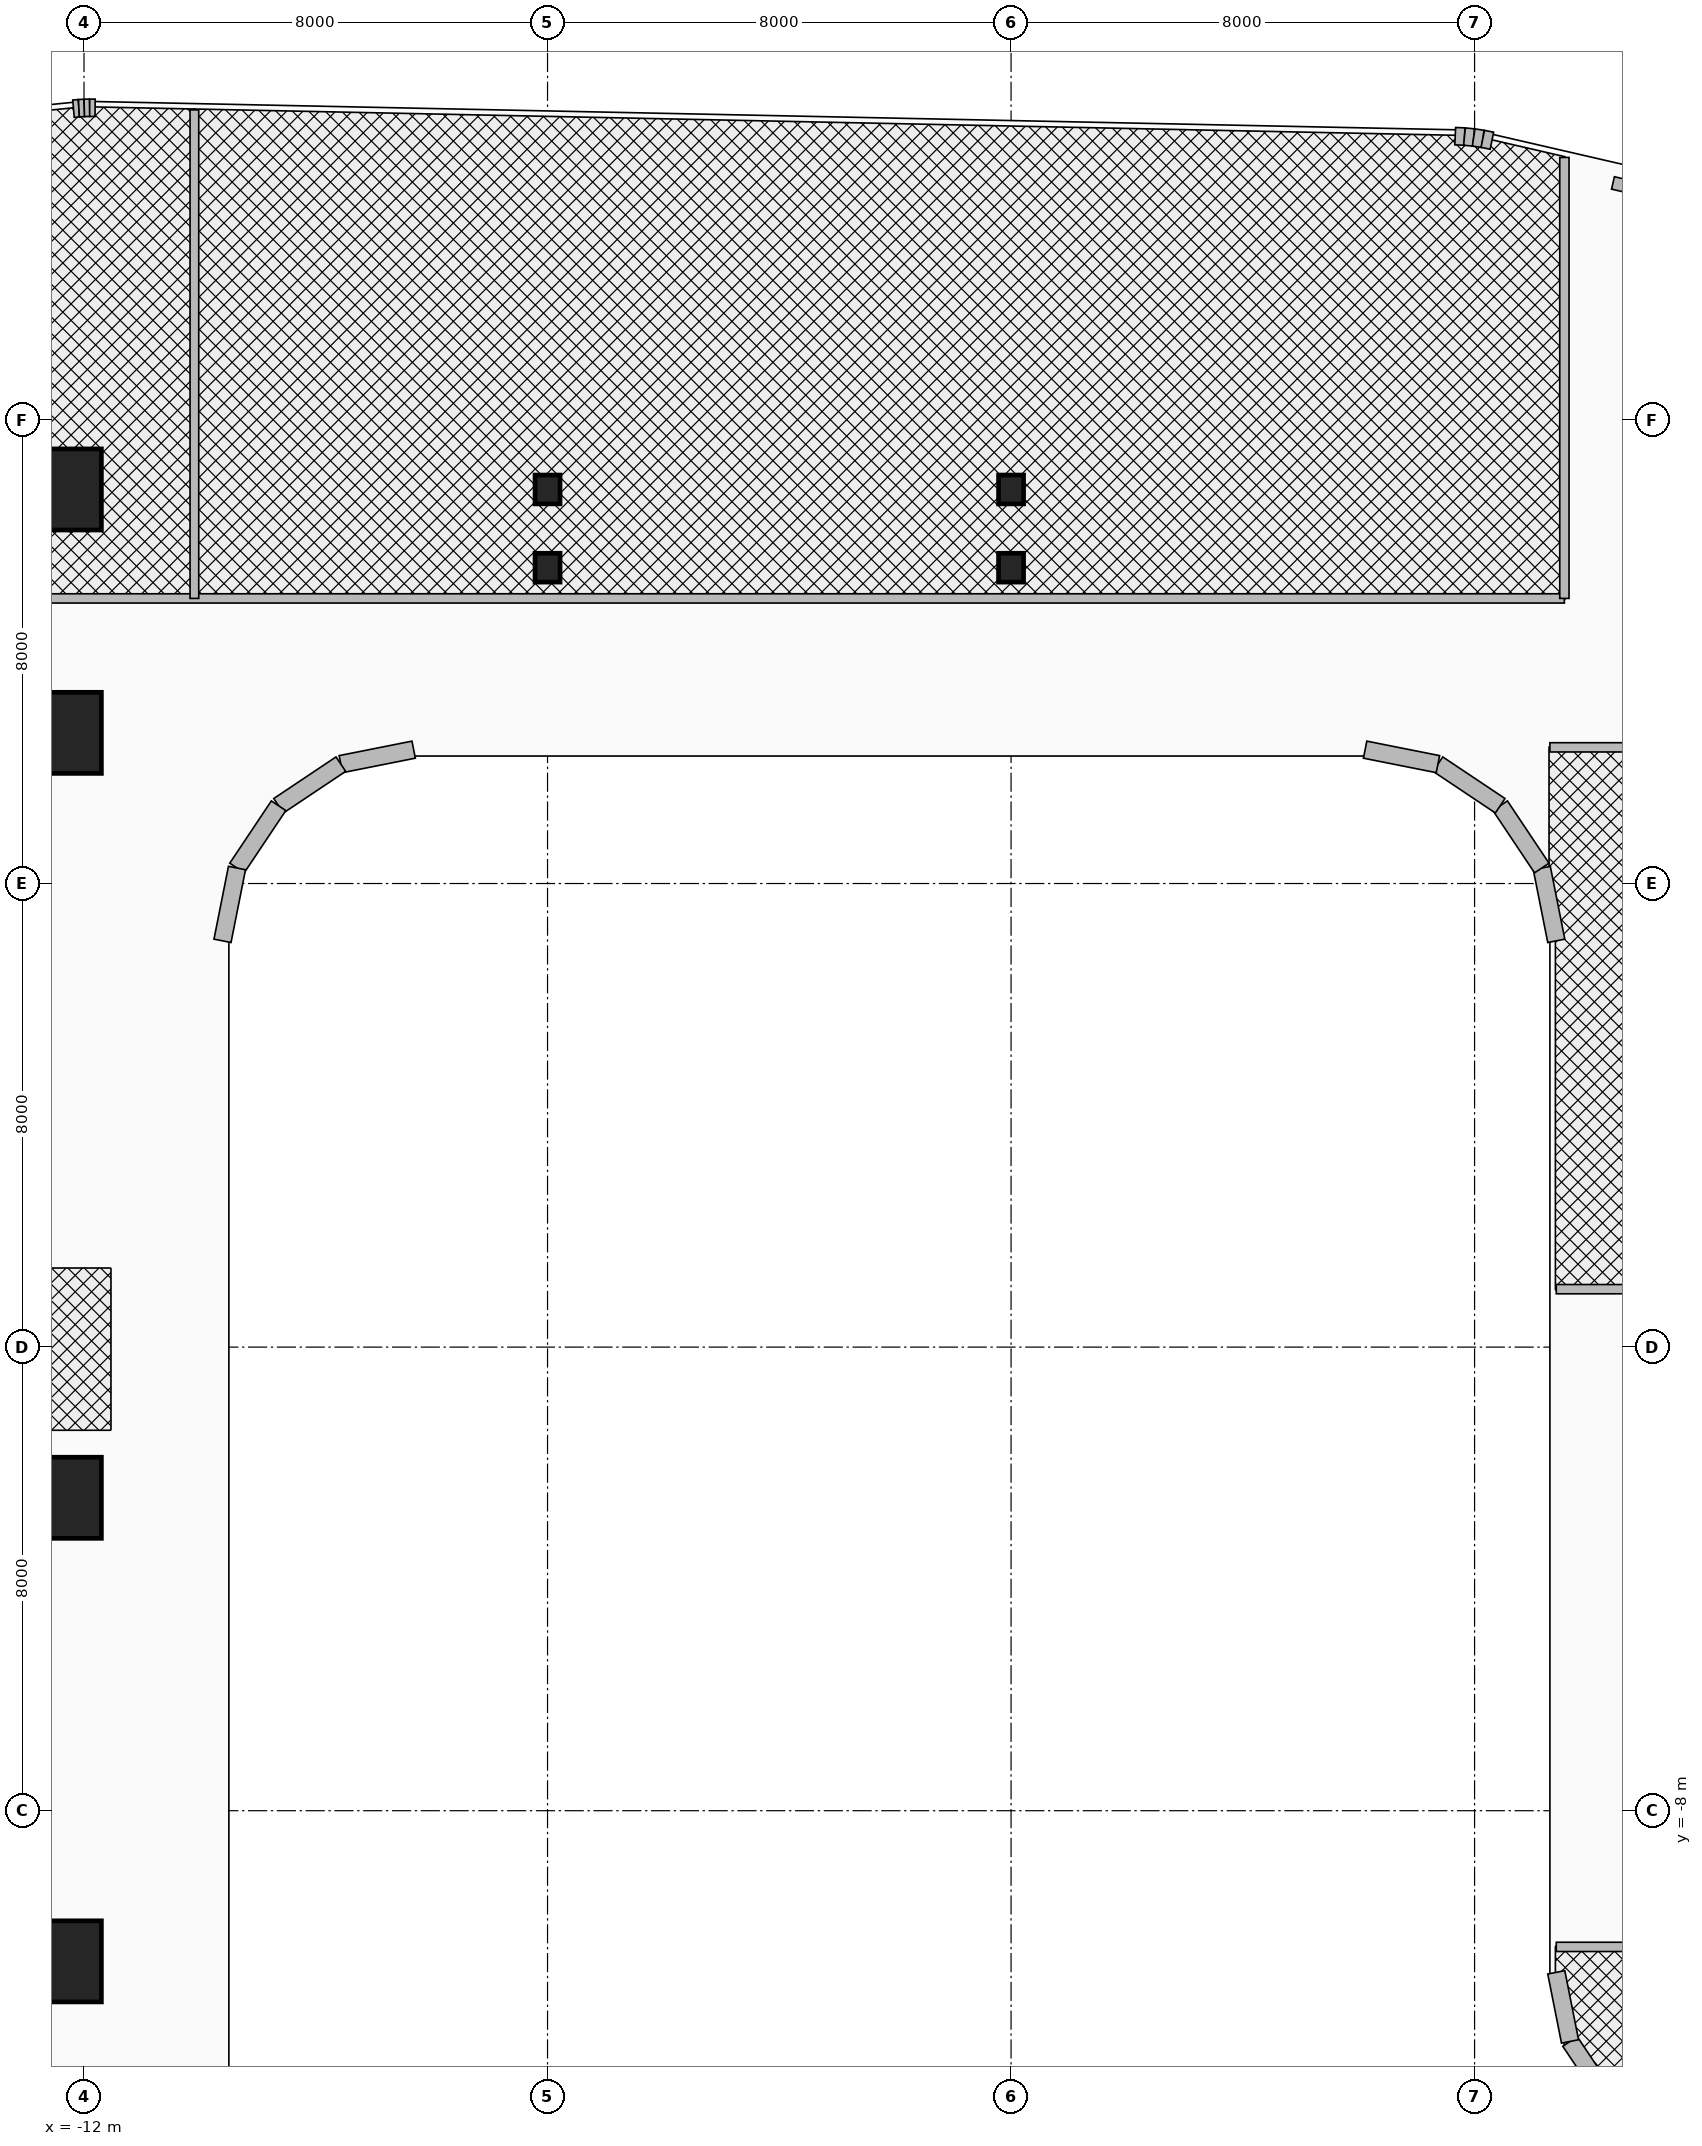
"""IFC4 building model, lengths in metres.
Left out: names, types, materials, properties, quantities, classifications, styles, units other than length and angle.
Written with IfcOpenShell. Run it as: python <this file> out.ifc"""

import sys

from ifc_helpers import new_model, si_unit, direction, frame, frame_2d, origin, origin_2d, place, context, subcontext, project, spatial, rectangle, i_section, extrude, source, transform, mapped, element, fill, save


model = new_model("IFC4")
c1 = context("Model", 3, precision=1e-05, world=origin(), true_north=direction((0.0, 1.0)))
c2 = subcontext(c1, "Body", "Model", "MODEL_VIEW")
j1 = project(units=[si_unit("LENGTHUNIT", "METRE"), si_unit("PLANEANGLEUNIT", "RADIAN")], contexts=[c1])
p1 = place(None, origin())
s1 = spatial("IfcSite", under=j1, at=p1, CompositionType="ELEMENT")
p2 = place(p1, origin())
s2 = spatial("IfcBuilding", under=s1, at=p2, CompositionType="ELEMENT")
p3 = place(p2, frame((0.0, 0.0, 70.4)))
s3 = spatial("IfcBuildingStorey", under=s2, at=p3, CompositionType="ELEMENT", Elevation=70.4)
for number, where, z_axis, x_axis in (
    (1, (-22.65, 10.8, 0.0), (0.0, 0.0, 1.0), (1.0, 0.0, 0.0)),
    (2, (-22.65, -10.8, 0.0), (0.0, 0.0, 1.0), (1.0, 0.0, 0.0)),
):
    element("IfcWall", number, at=place(p3, frame(where, z_axis=z_axis, x_axis=x_axis)), inside=s3, PredefinedType="SHEAR", context=c2, shape_type="SweptSolid", body=[
        extrude(rectangle(XDim=10.25, YDim=0.7, at=frame_2d((5.125, 0.0))), origin(), (0.0, 0.0, 1.0), 3.46),
    ])
m1 = source(origin(), c2, "Body", "SweptSolid", [
    extrude(rectangle(XDim=1.4, YDim=1.4, at=origin_2d()), origin(), (0.0, 0.0, 1.0), 3.7),
])
for number, where, z_axis, x_axis in (
    (3, (-12.4, -10.6, 0.0), (0.0, 0.0, 1.0), (1.0, 0.0, 0.0)),
    (4, (-12.4, -2.6, 0.0), (0.0, 0.0, 1.0), (1.0, 0.0, 0.0)),
    (5, (-12.4, 10.6, 0.0), (0.0, 0.0, 1.0), (1.0, 0.0, 0.0)),
    (6, (-12.4, 14.8, 0.0), (0.0, 0.0, 1.0), (1.0, 0.0, 0.0)),
):
    element("IfcColumn", number, at=place(p3, frame(where, z_axis=z_axis, x_axis=x_axis)), inside=s3, PredefinedType="COLUMN", context=c2, shape_type="MappedRepresentation", body=[
        mapped(m1, transform((0.0, 0.0, 0.0), x_axis=(1.0, 0.0, 0.0), y_axis=(0.0, 1.0, 0.0), z_axis=(0.0, 0.0, 1.0), scale=1.0)),
    ])
m2 = source(origin(), c2, "Body", "SweptSolid", [
    extrude(i_section(OverallWidth=0.432, OverallDepth=0.498, WebThickness=0.056, FlangeThickness=0.089, at=origin_2d()), origin(), (0.0, 0.0, 1.0), 3.7),
])
for number, where, z_axis, x_axis in (
    (7, (-4.0, 13.45, 0.0), (0.0, 0.0, 1.0), (1.0, 0.0, 0.0)),
    (8, (-4.0, 14.8, 0.0), (0.0, 0.0, 1.0), (1.0, 0.0, 0.0)),
    (9, (4.0, 13.45, 0.0), (0.0, 0.0, 1.0), (1.0, 0.0, 0.0)),
    (10, (4.0, 14.8, 0.0), (0.0, 0.0, 1.0), (1.0, 0.0, 0.0)),
):
    element("IfcColumn", number, at=place(p3, frame(where, z_axis=z_axis, x_axis=x_axis)), inside=s3, PredefinedType="COLUMN", context=c2, shape_type="MappedRepresentation", body=[
        mapped(m2, transform((0.0, 0.0, 0.0), x_axis=(1.0, 0.0, 0.0), y_axis=(0.0, 1.0, 0.0), z_axis=(0.0, 0.0, 1.0), scale=1.0)),
    ])
p4 = place(p3, frame((-12.182, 21.371, 0.0), z_axis=(0.0, 0.0, 1.0), x_axis=(0.996527790842, 0.08326080759, 0.0)))
e11 = element("IfcWall", 11, at=p4, inside=s3, PredefinedType="SOLIDWALL", context=c2, shape_type="SweptSolid", body=[
    extrude(rectangle(XDim=0.094, YDim=0.3, at=frame_2d((0.047, 0.0))), origin(), (0.0, 0.0, 1.0), 3.46),
])
p5 = place(p3, frame((-12.088, 21.379, 0.0), z_axis=(0.0, 0.0, 1.0), x_axis=(0.998476480444, 0.055178963393, 0.0)))
e12 = element("IfcWall", 12, at=p5, inside=s3, PredefinedType="SOLIDWALL", context=c2, shape_type="SweptSolid", body=[
    extrude(rectangle(XDim=0.093, YDim=0.3, at=frame_2d((0.046, 0.0))), origin(), (0.0, 0.0, 1.0), 3.46),
])
p6 = place(p3, frame((-11.996, 21.384, 0.0), z_axis=(0.0, 0.0, 1.0), x_axis=(0.999722573757, 0.023553673204, 0.0)))
e13 = element("IfcWall", 13, at=p6, inside=s3, PredefinedType="SOLIDWALL", context=c2, shape_type="SweptSolid", body=[
    extrude(rectangle(XDim=0.093, YDim=0.3, at=frame_2d((0.047, 0.0))), origin(), (0.0, 0.0, 1.0), 3.46),
])
p7 = place(p3, frame((-11.902, 21.386, 0.0), z_axis=(0.0, 0.0, 1.0), x_axis=(0.999986507273, -0.005194735103, 0.0)))
e14 = element("IfcWall", 14, at=p7, inside=s3, PredefinedType="SOLIDWALL", context=c2, shape_type="SweptSolid", body=[
    extrude(rectangle(XDim=0.094, YDim=0.3, at=frame_2d((0.047, 0.0))), origin(), (0.0, 0.0, 1.0), 3.46),
])
p8 = place(p3, frame((11.666, 20.897, 0.0), z_axis=(0.0, 0.0, 1.0), x_axis=(0.998885297239, -0.047203421059, 0.0)))
e15 = element("IfcWall", 15, at=p8, inside=s3, PredefinedType="SOLIDWALL", context=c2, shape_type="SweptSolid", body=[
    extrude(rectangle(XDim=0.16, YDim=0.3, at=frame_2d((0.08, 0.0))), origin(), (0.0, 0.0, 1.0), 3.46),
])
p9 = place(p3, frame((11.826, 20.889, 0.0), z_axis=(0.0, 0.0, 1.0), x_axis=(0.995172891136, -0.098137234257, 0.0)))
e16 = element("IfcWall", 16, at=p9, inside=s3, PredefinedType="SOLIDWALL", context=c2, shape_type="SweptSolid", body=[
    extrude(rectangle(XDim=0.159, YDim=0.3, at=frame_2d((0.08, 0.0))), origin(), (0.0, 0.0, 1.0), 3.46),
])
p10 = place(p3, frame((11.984, 20.874, 0.0), z_axis=(0.0, 0.0, 1.0), x_axis=(0.988846069207, -0.148941100486, 0.0)))
e17 = element("IfcWall", 17, at=p10, inside=s3, PredefinedType="SOLIDWALL", context=c2, shape_type="SweptSolid", body=[
    extrude(rectangle(XDim=0.159, YDim=0.3, at=frame_2d((0.08, 0.0))), origin(), (0.0, 0.0, 1.0), 3.46),
])
p11 = place(p3, frame((12.142, 20.85, 0.0), z_axis=(0.0, 0.0, 1.0), x_axis=(0.979991950448, -0.19903712482, 0.0)))
e18 = element("IfcWall", 18, at=p11, inside=s3, PredefinedType="SOLIDWALL", context=c2, shape_type="SweptSolid", body=[
    extrude(rectangle(XDim=0.161, YDim=0.3, at=frame_2d((0.08, 0.0))), origin(), (0.0, 0.0, 1.0), 3.46),
])
p12 = place(p3, frame((14.389, 20.09, 0.0), z_axis=(0.0, 0.0, 1.0), x_axis=(0.974400545997, -0.224818984875, 0.0)))
e19 = element("IfcWall", 19, at=p12, inside=s3, PredefinedType="SOLIDWALL", context=c2, shape_type="SweptSolid", body=[
    extrude(rectangle(XDim=2.2, YDim=0.22, at=frame_2d((1.1, 0.0))), origin(), (0.0, 0.0, 1.0), 3.46),
])
p13 = place(p12, frame((0.65, 0.0, 0.95)))
e20 = element("IfcOpeningElement", 20, at=p13, cuts=e19, PredefinedType="OPENING", context=c2, shape_type="SweptSolid", body=[
    extrude(rectangle(XDim=0.9, YDim=1.3, at=frame_2d((0.45, 0.65))), frame((0.0, 0.125, 0.0), z_axis=(0.0, -1.0, 0.0), x_axis=(1.0, 0.0, 0.0)), (0.0, 0.0, 1.0), 0.25),
])
p14 = place(p3, frame((14.317, -12.983, 0.0), z_axis=(0.0, 0.0, 1.0), x_axis=(-0.555635100982, 0.831426265255, 0.0)))
e21 = element("IfcWall", 21, at=p14, inside=s3, PredefinedType="SOLIDWALL", context=c2, shape_type="SweptSolid", body=[
    extrude(rectangle(XDim=1.205, YDim=0.3, at=frame_2d((0.603, 0.0))), origin(), (0.0, 0.0, 1.0), 3.46),
])
p15 = place(p3, frame((13.647, -11.982, 0.0), z_axis=(0.0, 0.0, 1.0), x_axis=(-0.195189223115, 0.980765602568, 0.0)))
e22 = element("IfcWall", 22, at=p15, inside=s3, PredefinedType="SOLIDWALL", context=c2, shape_type="SweptSolid", body=[
    extrude(rectangle(XDim=1.216, YDim=0.3, at=frame_2d((0.608, 0.0))), origin(), (0.0, 0.0, 1.0), 3.46),
])
p16 = place(p3, frame((13.41, 7.011, 0.0), z_axis=(0.0, 0.0, 1.0), x_axis=(-0.195090163074, 0.980785312019, 0.0)))
e23 = element("IfcWall", 23, at=p16, inside=s3, PredefinedType="SOLIDWALL", context=c2, shape_type="SweptSolid", body=[
    extrude(rectangle(XDim=1.281, YDim=0.3, at=frame_2d((0.641, 0.0))), origin(), (0.0, 0.0, 1.0), 3.46),
])
for number, where, z_axis, x_axis in (
    (24, (13.16, 8.268, 0.0), (0.0, 0.0, 1.0), (-0.556, 0.831, 0.0)),
    (25, (12.442, 9.342, 0.0), (0.0, 0.0, 1.0), (-0.831, 0.556, 0.0)),
):
    element("IfcWall", number, at=place(p3, frame(where, z_axis=z_axis, x_axis=x_axis)), inside=s3, PredefinedType="SOLIDWALL", context=c2, shape_type="SweptSolid", body=[
        extrude(rectangle(XDim=1.292, YDim=0.3, at=frame_2d((0.646, 0.0))), origin(), (0.0, 0.0, 1.0), 3.46),
    ])
for number, where, z_axis, x_axis in (
    (26, (11.367, 10.06, 0.0), (0.0, 0.0, 1.0), (-0.981, 0.195, 0.0)),
    (27, (-6.311, 10.31, 0.0), (0.0, 0.0, 1.0), (-0.981, -0.195, 0.0)),
):
    element("IfcWall", number, at=place(p3, frame(where, z_axis=z_axis, x_axis=x_axis)), inside=s3, PredefinedType="SOLIDWALL", context=c2, shape_type="SweptSolid", body=[
        extrude(rectangle(XDim=1.281, YDim=0.3, at=frame_2d((0.641, 0.0))), origin(), (0.0, 0.0, 1.0), 3.46),
    ])
p17 = place(p3, frame((-7.567, 10.06, 0.0), z_axis=(0.0, 0.0, 1.0), x_axis=(-0.831497739511, -0.555528135371, 0.0)))
e28 = element("IfcWall", 28, at=p17, inside=s3, PredefinedType="SOLIDWALL", context=c2, shape_type="SweptSolid", body=[
    extrude(rectangle(XDim=1.292, YDim=0.3, at=frame_2d((0.646, 0.0))), origin(), (0.0, 0.0, 1.0), 3.46),
])
p18 = place(p3, frame((-8.642, 9.342, 0.0), z_axis=(0.0, 0.0, 1.0), x_axis=(-0.555615398575, -0.831439431869, 0.0)))
e29 = element("IfcWall", 29, at=p18, inside=s3, PredefinedType="SOLIDWALL", context=c2, shape_type="SweptSolid", body=[
    extrude(rectangle(XDim=1.292, YDim=0.3, at=frame_2d((0.646, 0.0))), origin(), (0.0, 0.0, 1.0), 3.46),
])
p19 = place(p3, frame((-9.36, 8.268, 0.0), z_axis=(0.0, 0.0, 1.0), x_axis=(-0.195090163074, -0.980785312019, 0.0)))
e30 = element("IfcWall", 30, at=p19, inside=s3, PredefinedType="SOLIDWALL", context=c2, shape_type="SweptSolid", body=[
    extrude(rectangle(XDim=1.281, YDim=0.3, at=frame_2d((0.641, 0.0))), origin(), (0.0, 0.0, 1.0), 3.46),
])
p20 = place(p3, frame((-31.89, 12.92, 0.0), z_axis=(0.0, 0.0, 1.0), x_axis=(1.0, 0.0, 0.0)))
e31 = element("IfcWall", 31, at=p20, inside=s3, PredefinedType="PARTITIONING", context=c2, shape_type="SweptSolid", body=[
    extrude(rectangle(XDim=45.44, YDim=0.16, at=frame_2d((22.72, 0.0))), origin(), (0.0, 0.0, 1.0), 2.583),
])
p21 = place(p20, frame((10.448, 0.0, 0.0)))
e32 = element("IfcOpeningElement", 32, at=p21, cuts=e31, PredefinedType="OPENING", context=c2, shape_type="SweptSolid", body=[
    extrude(rectangle(XDim=0.9, YDim=2.1, at=frame_2d((0.45, 1.05))), frame((0.0, 0.095, 0.0), z_axis=(0.0, -1.0, 0.0), x_axis=(1.0, 0.0, 0.0)), (0.0, 0.0, 1.0), 0.19),
])
p22 = place(p20, frame((33.167, 0.0, 0.0)))
e33 = element("IfcOpeningElement", 33, at=p22, cuts=e31, PredefinedType="OPENING", context=c2, shape_type="SweptSolid", body=[
    extrude(rectangle(XDim=0.9, YDim=2.1, at=frame_2d((0.45, 1.05))), frame((0.0, 0.095, 0.0), z_axis=(0.0, -1.0, 0.0), x_axis=(1.0, 0.0, 0.0)), (0.0, 0.0, 1.0), 0.19),
])
p23 = place(p3, frame((13.55, 12.92, 0.0), z_axis=(0.0, 0.0, 1.0), x_axis=(0.0, 1.0, 0.0)))
e34 = element("IfcWall", 34, at=p23, inside=s3, PredefinedType="PARTITIONING", context=c2, shape_type="SweptSolid", body=[
    extrude(rectangle(XDim=7.609, YDim=0.16, at=frame_2d((3.805, 0.0))), origin(), (0.0, 0.0, 1.0), 2.583),
])
p24 = place(p3, frame((-10.095, 12.92, 0.0), z_axis=(0.0, 0.0, 1.0), x_axis=(0.0, 1.0, 0.0)))
e35 = element("IfcWall", 35, at=p24, inside=s3, PredefinedType="PARTITIONING", context=c2, shape_type="SweptSolid", body=[
    extrude(rectangle(XDim=8.43, YDim=0.15, at=frame_2d((4.215, 0.0))), origin(), (0.0, 0.0, 1.0), 2.583),
])
p25 = place(p3, frame((13.41, -10.35, 0.0), z_axis=(0.0, 0.0, 1.0), x_axis=(1.0, 0.0, 0.0)))
e36 = element("IfcWall", 36, at=p25, inside=s3, PredefinedType="PARTITIONING", context=c2, shape_type="SweptSolid", body=[
    extrude(rectangle(XDim=12.19, YDim=0.16, at=frame_2d((6.095, 0.0))), origin(), (0.0, 0.0, 1.0), 3.46),
])
p26 = place(p3, frame((13.3, 10.35, 0.0), z_axis=(0.0, 0.0, 1.0), x_axis=(1.0, 0.0, 0.0)))
e37 = element("IfcWall", 37, at=p26, inside=s3, PredefinedType="PARTITIONING", context=c2, shape_type="SweptSolid", body=[
    extrude(rectangle(XDim=2.1, YDim=0.16, at=frame_2d((1.05, 0.0))), origin(), (0.0, 0.0, 1.0), 2.583),
])
p27 = place(p26, frame((0.45, 0.0, 0.0)))
e38 = element("IfcOpeningElement", 38, at=p27, cuts=e37, PredefinedType="OPENING", context=c2, shape_type="SweptSolid", body=[
    extrude(rectangle(XDim=0.9, YDim=2.1, at=frame_2d((0.45, 1.05))), frame((0.0, 0.095, 0.0), z_axis=(0.0, -1.0, 0.0), x_axis=(1.0, 0.0, 0.0)), (0.0, 0.0, 1.0), 0.19),
])
p28 = place(p3, frame((13.41, 1.0, 0.0), z_axis=(0.0, 0.0, 1.0), x_axis=(1.0, 0.0, 0.0)))
e39 = element("IfcWall", 39, at=p28, inside=s3, PredefinedType="PARTITIONING", context=c2, shape_type="SweptSolid", body=[
    extrude(rectangle(XDim=1.99, YDim=0.16, at=frame_2d((0.995, 0.0))), origin(), (0.0, 0.0, 1.0), 2.245),
])
p29 = place(p22, origin())
e40 = element("IfcDoor", 40, at=p29, inside=s3, OperationType="SINGLE_SWING_RIGHT", PredefinedType="DOOR", context=c2, shape_type="SweptSolid", body=[
    extrude(rectangle(XDim=0.9, YDim=2.1, at=frame_2d((0.45, 1.05))), frame((0.0, 0.025, 0.0), z_axis=(0.0, -1.0, 0.0), x_axis=(1.0, 0.0, 0.0)), (0.0, 0.0, 1.0), 0.05),
])
fill(e33, e40)
p30 = place(p27, origin())
e41 = element("IfcDoor", 41, at=p30, inside=s3, OperationType="SINGLE_SWING_RIGHT", PredefinedType="DOOR", context=c2, shape_type="SweptSolid", body=[
    extrude(rectangle(XDim=0.9, YDim=2.1, at=frame_2d((0.45, 1.05))), frame((0.0, 0.025, 0.0), z_axis=(0.0, -1.0, 0.0), x_axis=(1.0, 0.0, 0.0)), (0.0, 0.0, 1.0), 0.05),
])
fill(e38, e41)
save(model, sys.argv[1])
